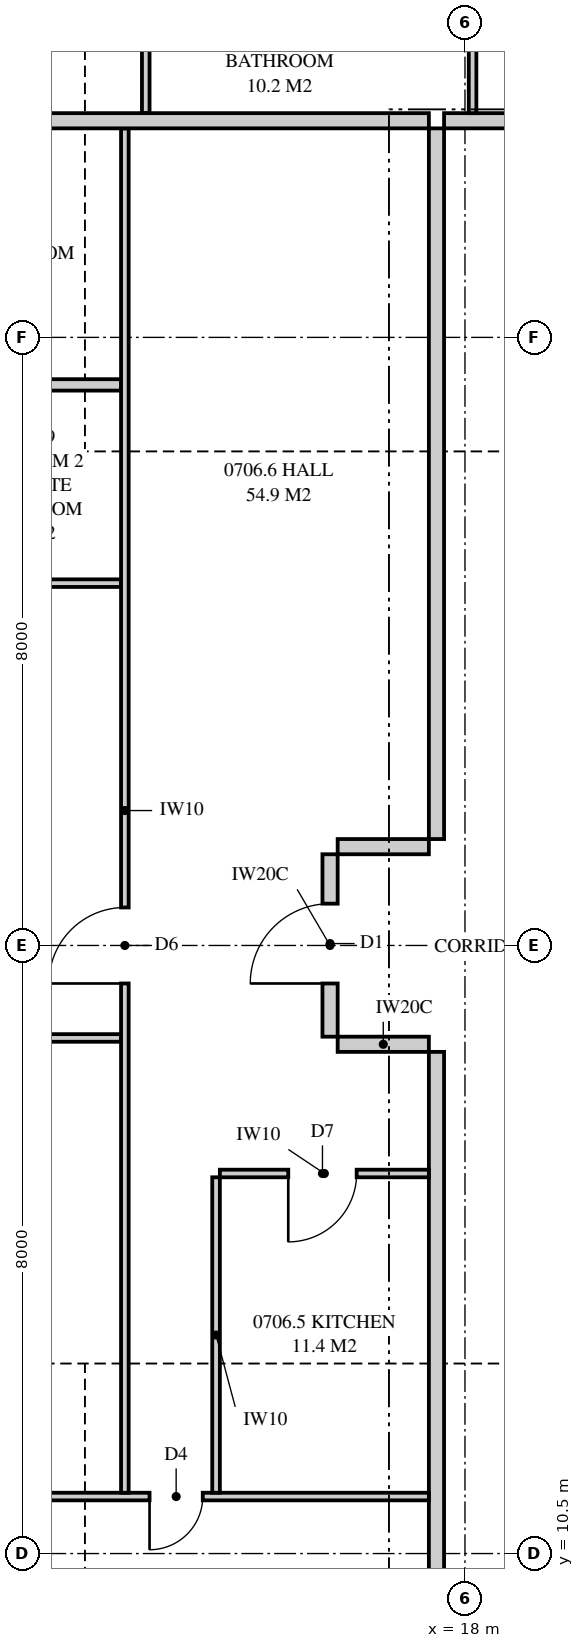
"""IFC4 building model, lengths in metres.
Left out: names, types, materials, properties, quantities, classifications, styles, units other than length and angle.
Written with IfcOpenShell. Run it as: python <this file> out.ifc"""

import sys

from ifc_helpers import new_model, si_unit, direction, frame, frame_2d, origin, place, context, subcontext, project, spatial, polyline, rectangle, outline, extrude, element, fill, save


model = new_model("IFC4")
c1 = context("Model", 3, precision=1e-05, world=origin(), true_north=direction((0.0, 1.0)))
c2 = subcontext(c1, "Body", "Model", "MODEL_VIEW")
j1 = project(units=[si_unit("LENGTHUNIT", "METRE"), si_unit("PLANEANGLEUNIT", "RADIAN")], contexts=[c1])
p1 = place(None, origin())
s1 = spatial("IfcSite", under=j1, at=p1, CompositionType="ELEMENT")
p2 = place(p1, origin())
s2 = spatial("IfcBuilding", under=s1, at=p2, CompositionType="ELEMENT")
p3 = place(p2, frame((0.0, 0.0, 31.05)))
s3 = spatial("IfcBuildingStorey", under=s2, at=p3, CompositionType="ELEMENT", Elevation=31.05)
p4 = place(p3, frame((17.725, 29.35, 0.0), z_axis=(0.0, 0.0, 1.0), x_axis=(1.0, 0.0, 0.0)))
e1 = element("IfcWall", 1, at=p4, inside=s3, PredefinedType="PARTITIONING", context=c2, shape_type="SweptSolid", body=[
    extrude(rectangle(XDim=3.525, YDim=0.2, at=frame_2d((1.762, 0.0))), origin(), (0.0, 0.0, 1.0), 3.11),
])
p5 = place(p3, frame((13.8, 37.825, 0.0), z_axis=(0.0, 0.0, 1.0), x_axis=(0.0, -1.0, 0.0)))
e2 = element("IfcWall", 2, at=p5, inside=s3, PredefinedType="PARTITIONING", context=c2, shape_type="SweptSolid", body=[
    extrude(outline(polyline([(1.635, 2.15), (0.0, 2.15), (0.0, 0.0), (8.375, 0.0), (8.375, 3.11), (1.635, 3.11), (1.635, 2.15)]), holes=[polyline([(1.021, 0.126), (0.529, 0.126), (0.529, 0.919), (1.021, 0.919), (1.021, 0.126)]), polyline([(1.021, 1.231), (0.529, 1.231), (0.529, 2.024), (1.021, 2.024), (1.021, 1.231)])]), frame((0.0, 0.05, 0.0), z_axis=(0.0, -1.0, 0.0), x_axis=(1.0, 0.0, 0.0)), (0.0, 0.0, 1.0), 0.1),
])
p6 = place(p5, frame((4.525, 0.0, 0.0)))
e3 = element("IfcOpeningElement", 3, at=p6, cuts=e2, PredefinedType="OPENING", context=c2, shape_type="SweptSolid", body=[
    extrude(rectangle(XDim=0.9, YDim=2.1, at=frame_2d((0.45, 1.05))), frame((0.0, 0.06, 0.0), z_axis=(0.0, -1.0, 0.0), x_axis=(1.0, 0.0, 0.0)), (0.0, 0.0, 1.0), 0.12),
])
p7 = place(p3, frame((18.1, 37.825, 0.0), z_axis=(0.0, 0.0, 1.0), x_axis=(0.0, -1.0, 0.0)))
e4 = element("IfcWall", 4, at=p7, inside=s3, PredefinedType="PARTITIONING", context=c2, shape_type="SweptSolid", body=[
    extrude(outline(polyline([(0.0, 0.0), (8.375, 0.0), (8.375, 3.11), (1.635, 3.11), (1.635, 2.15), (0.0, 2.15), (0.0, 3.11), (0.0, 0.0)])), frame((0.0, 0.05, 0.0), z_axis=(0.0, -1.0, 0.0), x_axis=(1.0, 0.0, 0.0)), (0.0, 0.0, 1.0), 0.1),
])
p8 = place(p7, frame((4.525, 0.0, 0.0)))
e5 = element("IfcOpeningElement", 5, at=p8, cuts=e4, PredefinedType="OPENING", context=c2, shape_type="SweptSolid", body=[
    extrude(rectangle(XDim=0.9, YDim=2.1, at=frame_2d((0.45, 1.05))), frame((0.0, 0.06, 0.0), z_axis=(0.0, -1.0, 0.0), x_axis=(1.0, 0.0, 0.0)), (0.0, 0.0, 1.0), 0.12),
])
p9 = place(p3, frame((2.0, 29.35, 0.0), z_axis=(0.0, 0.0, 1.0), x_axis=(1.0, 0.0, 0.0)))
e6 = element("IfcWall", 6, at=p9, inside=s3, PredefinedType="PARTITIONING", context=c2, shape_type="SweptSolid", body=[
    extrude(outline(polyline([(0.0, 0.0), (15.525, 0.0), (15.525, 3.11), (11.337, 3.11), (11.337, 2.541), (10.663, 2.541), (10.663, 3.11), (9.51, 3.11), (9.51, 2.51), (6.89, 2.51), (6.89, 3.11), (2.969, 3.11), (2.969, 2.541), (2.577, 2.541), (2.577, 2.15), (0.733, 2.15), (0.733, 3.11), (0.0, 3.11), (0.0, 0.0)])), frame((0.0, 0.1, 0.0), z_axis=(0.0, -1.0, 0.0), x_axis=(1.0, 0.0, 0.0)), (0.0, 0.0, 1.0), 0.2),
])
p10 = place(p3, frame((17.625, 7.75, 0.0), z_axis=(0.0, 0.0, 1.0), x_axis=(0.0, 1.0, 0.0)))
e7 = element("IfcWall", 7, at=p10, inside=s3, PredefinedType="PARTITIONING", context=c2, shape_type="SweptSolid", body=[
    extrude(outline(polyline([(0.0, 0.0), (9.35, 0.0), (9.35, 3.11), (5.587, 3.11), (5.587, 2.541), (4.913, 2.541), (4.913, 3.11), (0.0, 3.11), (0.0, 0.0)])), frame((0.0, 0.1, 0.0), z_axis=(0.0, -1.0, 0.0), x_axis=(1.0, 0.0, 0.0)), (0.0, 0.0, 1.0), 0.2),
])
p11 = place(p3, frame((2.175, 11.25, 0.0), z_axis=(0.0, 0.0, 1.0), x_axis=(1.0, 0.0, 0.0)))
e8 = element("IfcWall", 8, at=p11, inside=s3, PredefinedType="PARTITIONING", context=c2, shape_type="SweptSolid", body=[
    extrude(outline(polyline([(0.188, 3.11), (0.0, 3.11), (0.0, 0.0), (0.529, 0.0), (0.529, 0.263), (1.021, 0.263), (1.021, 0.0), (15.35, 0.0), (15.35, 3.11), (11.112, 3.11), (11.112, 2.541), (10.538, 2.541), (10.538, 3.11), (9.285, 3.11), (9.285, 2.51), (6.765, 2.51), (6.765, 3.11), (2.744, 3.11), (2.744, 2.541), (2.169, 2.541), (2.169, 3.11), (1.93, 3.11), (1.93, 2.15), (1.021, 2.15), (1.021, 1.887), (0.529, 1.887), (0.529, 2.15), (0.188, 2.15), (0.188, 3.11)])), frame((0.0, 0.05, 0.0), z_axis=(0.0, -1.0, 0.0), x_axis=(1.0, 0.0, 0.0)), (0.0, 0.0, 1.0), 0.1),
])
p12 = place(p11, frame((4.85, 0.0, 0.0)))
e9 = element("IfcOpeningElement", 9, at=p12, cuts=e8, PredefinedType="OPENING", context=c2, shape_type="SweptSolid", body=[
    extrude(rectangle(XDim=0.9, YDim=2.1, at=frame_2d((0.45, 1.05))), frame((0.0, 0.06, 0.0), z_axis=(0.0, -1.0, 0.0), x_axis=(1.0, 0.0, 0.0)), (0.0, 0.0, 1.0), 0.12),
])
p13 = place(p11, frame((6.25, 0.0, 0.0)))
e10 = element("IfcOpeningElement", 10, at=p13, cuts=e8, PredefinedType="OPENING", context=c2, shape_type="SweptSolid", body=[
    extrude(rectangle(XDim=0.9, YDim=2.1, at=frame_2d((0.45, 1.05))), frame((0.0, 0.06, 0.0), z_axis=(0.0, -1.0, 0.0), x_axis=(1.0, 0.0, 0.0)), (0.0, 0.0, 1.0), 0.12),
])
p14 = place(p11, frame((11.675, 0.0, 0.0)))
e11 = element("IfcOpeningElement", 11, at=p14, cuts=e8, PredefinedType="OPENING", context=c2, shape_type="SweptSolid", body=[
    extrude(rectangle(XDim=0.7, YDim=2.1, at=frame_2d((0.35, 1.05))), frame((0.0, 0.06, 0.0), z_axis=(0.0, -1.0, 0.0), x_axis=(1.0, 0.0, 0.0)), (0.0, 0.0, 1.0), 0.12),
])
p15 = place(p3, frame((13.525, 11.3, 0.0), z_axis=(0.0, 0.0, 1.0), x_axis=(0.0, 1.0, 0.0)))
e12 = element("IfcWall", 12, at=p15, inside=s3, PredefinedType="PARTITIONING", context=c2, shape_type="SweptSolid", body=[
    extrude(outline(polyline([(0.0, 0.0), (17.95, 0.0), (17.95, 3.11), (13.987, 3.11), (13.987, 2.541), (13.413, 2.541), (13.413, 3.11), (1.987, 3.11), (1.987, 2.541), (1.413, 2.541), (1.413, 3.11), (0.0, 3.11), (0.0, 0.0)])), frame((0.0, 0.05, 0.0), z_axis=(0.0, -1.0, 0.0), x_axis=(1.0, 0.0, 0.0)), (0.0, 0.0, 1.0), 0.1),
])
p16 = place(p15, frame((6.7, 0.0, 0.0)))
e13 = element("IfcOpeningElement", 13, at=p16, cuts=e12, PredefinedType="OPENING", context=c2, shape_type="SweptSolid", body=[
    extrude(rectangle(XDim=1.0, YDim=2.1, at=frame_2d((0.5, 1.05))), frame((0.0, 0.06, 0.0), z_axis=(0.0, -1.0, 0.0), x_axis=(1.0, 0.0, 0.0)), (0.0, 0.0, 1.0), 0.12),
])
p17 = place(p3, frame((14.725, 11.3, 0.0), z_axis=(0.0, 0.0, 1.0), x_axis=(0.0, 1.0, 0.0)))
e14 = element("IfcWall", 14, at=p17, inside=s3, PredefinedType="PARTITIONING", context=c2, shape_type="SweptSolid", body=[
    extrude(outline(polyline([(0.0, 0.0), (4.15, 0.0), (4.15, 3.11), (1.987, 3.11), (1.987, 2.541), (1.413, 2.541), (1.413, 3.11), (0.0, 3.11), (0.0, 0.0)])), frame((0.0, 0.05, 0.0), z_axis=(0.0, -1.0, 0.0), x_axis=(1.0, 0.0, 0.0)), (0.0, 0.0, 1.0), 0.1),
])
p18 = place(p3, frame((14.775, 15.5, 0.0), z_axis=(0.0, 0.0, 1.0), x_axis=(1.0, 0.0, 0.0)))
e15 = element("IfcWall", 15, at=p18, inside=s3, PredefinedType="PARTITIONING", context=c2, shape_type="SweptSolid", body=[
    extrude(rectangle(XDim=2.75, YDim=0.1, at=frame_2d((1.375, 0.0))), origin(), (0.0, 0.0, 1.0), 3.11),
])
p19 = place(p18, frame((0.9, 0.0, 0.0)))
e16 = element("IfcOpeningElement", 16, at=p19, cuts=e15, PredefinedType="OPENING", context=c2, shape_type="SweptSolid", body=[
    extrude(rectangle(XDim=0.9, YDim=2.1, at=frame_2d((0.45, 1.05))), frame((0.0, 0.06, 0.0), z_axis=(0.0, -1.0, 0.0), x_axis=(1.0, 0.0, 0.0)), (0.0, 0.0, 1.0), 0.12),
])
p20 = place(p3, frame((2.175, 17.283, 0.0), z_axis=(0.0, 0.0, 1.0), x_axis=(1.0, 0.0, 0.0)))
e17 = element("IfcWall", 17, at=p20, inside=s3, PredefinedType="PARTITIONING", context=c2, shape_type="SweptSolid", body=[
    extrude(outline(polyline([(0.0, 0.0), (11.3, 0.0), (11.3, 3.11), (9.285, 3.11), (9.285, 2.51), (6.765, 2.51), (6.765, 3.11), (1.635, 3.11), (1.635, 2.15), (0.0, 2.15), (0.0, 3.11), (0.0, 0.0)])), frame((0.0, 0.05, 0.0), z_axis=(0.0, -1.0, 0.0), x_axis=(1.0, 0.0, 0.0)), (0.0, 0.0, 1.0), 0.1),
])
p21 = place(p20, frame((5.15, 0.0, 0.0)))
e18 = element("IfcOpeningElement", 18, at=p21, cuts=e17, PredefinedType="OPENING", context=c2, shape_type="SweptSolid", body=[
    extrude(rectangle(XDim=1.0, YDim=2.1, at=frame_2d((0.5, 1.05))), frame((0.0, 0.06, 0.0), z_axis=(0.0, -1.0, 0.0), x_axis=(1.0, 0.0, 0.0)), (0.0, 0.0, 1.0), 0.12),
])
p22 = place(p3, frame((2.175, 23.267, 0.0), z_axis=(0.0, 0.0, 1.0), x_axis=(1.0, 0.0, 0.0)))
e19 = element("IfcWall", 19, at=p22, inside=s3, PredefinedType="PARTITIONING", context=c2, shape_type="SweptSolid", body=[
    extrude(outline(polyline([(0.529, 2.15), (0.0, 2.15), (0.0, 0.0), (0.529, 0.0), (0.529, 0.274), (1.021, 0.274), (1.021, 0.0), (11.3, 0.0), (11.3, 3.11), (9.285, 3.11), (9.285, 2.51), (6.765, 2.51), (6.765, 3.11), (1.635, 3.11), (1.635, 2.15), (1.021, 2.15), (1.021, 1.876), (0.529, 1.876), (0.529, 2.15)])), frame((0.0, 0.05, 0.0), z_axis=(0.0, -1.0, 0.0), x_axis=(1.0, 0.0, 0.0)), (0.0, 0.0, 1.0), 0.1),
])
p23 = place(p22, frame((5.15, 0.0, 0.0)))
e20 = element("IfcOpeningElement", 20, at=p23, cuts=e19, PredefinedType="OPENING", context=c2, shape_type="SweptSolid", body=[
    extrude(rectangle(XDim=1.0, YDim=2.1, at=frame_2d((0.5, 1.05))), frame((0.0, 0.06, 0.0), z_axis=(0.0, -1.0, 0.0), x_axis=(1.0, 0.0, 0.0)), (0.0, 0.0, 1.0), 0.12),
])
p24 = place(p3, frame((17.625, 19.9, 0.0), z_axis=(0.0, 0.0, 1.0), x_axis=(0.0, 1.0, 0.0)))
e21 = element("IfcWall", 21, at=p24, inside=s3, PredefinedType="PARTITIONING", context=c2, shape_type="SweptSolid", body=[
    extrude(outline(polyline([(0.0, 0.0), (9.35, 0.0), (9.35, 3.11), (5.437, 3.11), (5.437, 2.541), (4.763, 2.541), (4.763, 3.11), (0.0, 3.11), (0.0, 0.0)])), frame((0.0, 0.1, 0.0), z_axis=(0.0, -1.0, 0.0), x_axis=(1.0, 0.0, 0.0)), (0.0, 0.0, 1.0), 0.2),
])
p25 = place(p3, frame((16.225, 17.3, 0.0), z_axis=(0.0, 0.0, 1.0), x_axis=(0.0, 1.0, 0.0)))
e22 = element("IfcWall", 22, at=p25, inside=s3, PredefinedType="PARTITIONING", context=c2, shape_type="SweptSolid", body=[
    extrude(rectangle(XDim=2.4, YDim=0.2, at=frame_2d((1.2, 0.0))), origin(), (0.0, 0.0, 1.0), 3.11),
])
p26 = place(p25, frame((0.7, 0.0, 0.0)))
e23 = element("IfcOpeningElement", 23, at=p26, cuts=e22, PredefinedType="OPENING", context=c2, shape_type="SweptSolid", body=[
    extrude(rectangle(XDim=1.05, YDim=2.2, at=frame_2d((0.525, 1.1))), frame((0.0, 0.11, 0.0), z_axis=(0.0, -1.0, 0.0), x_axis=(1.0, 0.0, 0.0)), (0.0, 0.0, 1.0), 0.22),
])
for number, where, z_axis, x_axis in (
    (24, (17.525, 17.2, 0.0), (0.0, 0.0, 1.0), (-1.0, 0.0, 0.0)),
    (25, (17.525, 19.8, 0.0), (0.0, 0.0, 1.0), (-1.0, 0.0, 0.0)),
):
    element("IfcWall", number, at=place(p3, frame(where, z_axis=z_axis, x_axis=x_axis)), inside=s3, PredefinedType="PARTITIONING", context=c2, shape_type="SweptSolid", body=[
        extrude(rectangle(XDim=1.2, YDim=0.2, at=frame_2d((0.6, 0.0))), origin(), (0.0, 0.0, 1.0), 3.11),
    ])
p27 = place(p3, frame((8.675, 25.875, 0.0), z_axis=(0.0, 0.0, 1.0), x_axis=(1.0, 0.0, 0.0)))
e26 = element("IfcWall", 26, at=p27, inside=s3, PredefinedType="PLUMBINGWALL", context=c2, shape_type="SweptSolid", body=[
    extrude(outline(polyline([(0.0, 0.0), (4.8, 0.0), (4.8, 3.11), (4.637, 3.11), (4.637, 2.541), (4.013, 2.541), (4.013, 3.11), (2.81, 3.11), (2.81, 2.51), (0.24, 2.51), (0.24, 3.11), (0.0, 3.11), (0.0, 0.0)])), frame((0.0, 0.075, 0.0), z_axis=(0.0, -1.0, 0.0), x_axis=(1.0, 0.0, 0.0)), (0.0, 0.0, 1.0), 0.15),
])
p28 = place(p26, origin())
e27 = element("IfcDoor", 27, at=p28, inside=s3, OperationType="SINGLE_SWING_LEFT", PredefinedType="DOOR", context=c2, shape_type="SweptSolid", body=[
    extrude(rectangle(XDim=1.05, YDim=2.2, at=frame_2d((0.525, 1.1))), frame((0.0, 0.025, 0.0), z_axis=(0.0, -1.0, 0.0), x_axis=(1.0, 0.0, 0.0)), (0.0, 0.0, 1.0), 0.05),
])
fill(e23, e27)
p29 = place(p14, frame((0.7, 0.0, 0.0), z_axis=(0.0, 0.0, 1.0), x_axis=(-1.0, 0.0, 0.0)))
e28 = element("IfcDoor", 28, at=p29, inside=s3, OperationType="SINGLE_SWING_RIGHT", PredefinedType="DOOR", context=c2, shape_type="SweptSolid", body=[
    extrude(rectangle(XDim=0.7, YDim=2.1, at=frame_2d((0.35, 1.05))), frame((0.0, 0.025, 0.0), z_axis=(0.0, -1.0, 0.0), x_axis=(1.0, 0.0, 0.0)), (0.0, 0.0, 1.0), 0.05),
])
fill(e11, e28)
p30 = place(p19, frame((0.9, 0.0, 0.0), z_axis=(0.0, 0.0, 1.0), x_axis=(-1.0, 0.0, 0.0)))
e29 = element("IfcDoor", 29, at=p30, inside=s3, OperationType="SINGLE_SWING_RIGHT", PredefinedType="DOOR", context=c2, shape_type="SweptSolid", body=[
    extrude(rectangle(XDim=0.9, YDim=2.1, at=frame_2d((0.45, 1.05))), frame((0.0, 0.025, 0.0), z_axis=(0.0, -1.0, 0.0), x_axis=(1.0, 0.0, 0.0)), (0.0, 0.0, 1.0), 0.05),
])
fill(e16, e29)
p31 = place(p16, origin())
e30 = element("IfcDoor", 30, at=p31, inside=s3, OperationType="SINGLE_SWING_LEFT", PredefinedType="DOOR", context=c2, shape_type="SweptSolid", body=[
    extrude(rectangle(XDim=1.0, YDim=2.1, at=frame_2d((0.5, 1.05))), frame((0.0, 0.025, 0.0), z_axis=(0.0, -1.0, 0.0), x_axis=(1.0, 0.0, 0.0)), (0.0, 0.0, 1.0), 0.05),
])
fill(e13, e30)
save(model, sys.argv[1])
